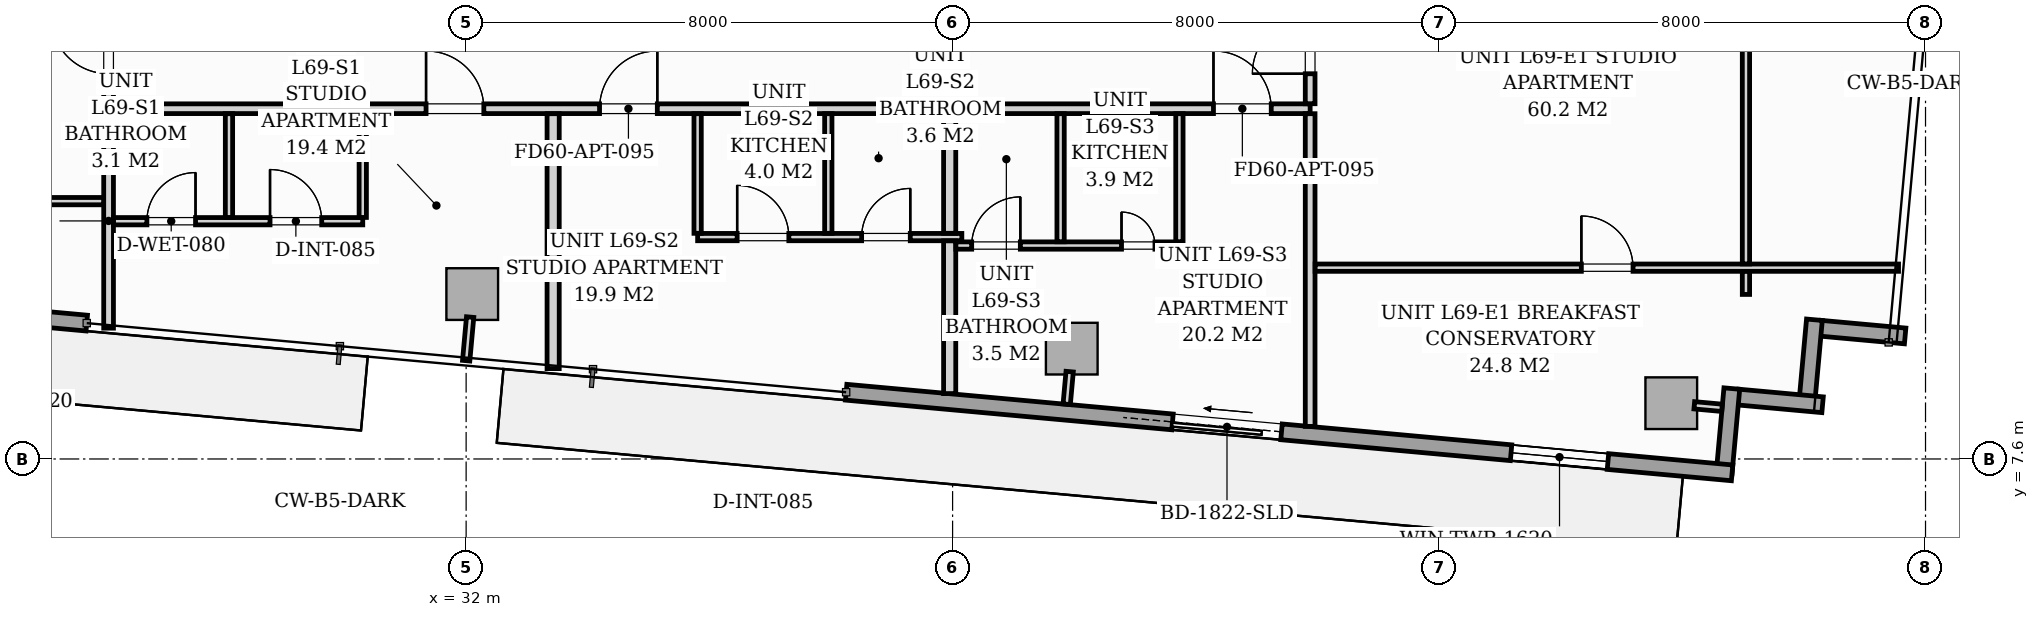
"""IFC4 building model, lengths in metres.
Left out: names, types, materials, properties, quantities, classifications, styles, units other than length and angle.
Written with IfcOpenShell. Run it as: python <this file> out.ifc"""

import sys

from ifc_helpers import new_model, si_unit, direction, frame, frame_2d, origin, origin_2d, place, context, subcontext, project, spatial, rectangle, extrude, source, transform, mapped, element, fill, save


model = new_model("IFC4")
c1 = context("Model", 3, precision=1e-05, world=origin(), true_north=direction((0.0, 1.0)))
c2 = subcontext(c1, "Body", "Model", "MODEL_VIEW")
j1 = project(units=[si_unit("LENGTHUNIT", "METRE"), si_unit("PLANEANGLEUNIT", "RADIAN")], contexts=[c1])
p1 = place(None, origin())
s1 = spatial("IfcSite", under=j1, at=p1, CompositionType="ELEMENT")
p2 = place(p1, origin())
s2 = spatial("IfcBuilding", under=s1, at=p2, CompositionType="ELEMENT")
p3 = place(p2, frame((0.0, 0.0, 239.7)))
s3 = spatial("IfcBuildingStorey", under=s2, at=p3, CompositionType="ELEMENT", Elevation=239.7)
m1 = source(origin(), c2, "Body", "SweptSolid", [
    extrude(rectangle(XDim=0.85, YDim=0.85, at=origin_2d()), origin(), (0.0, 0.0, 1.0), 3.296),
])
for number, where, z_axis, x_axis in (
    (1, (32.1, 10.312, 0.002), (0.0, 0.0, 1.0), (0.996, -0.091, 0.0)),
    (2, (41.96, 9.415, 0.002), (0.0, 0.0, 1.0), (0.996, -0.091, 0.0)),
    (3, (51.819, 8.517, 0.002), (0.0, 0.0, 1.0), (0.996, -0.091, 0.0)),
):
    element("IfcColumn", number, at=place(p3, frame(where, z_axis=z_axis, x_axis=x_axis)), inside=s3, PredefinedType="COLUMN", context=c2, shape_type="MappedRepresentation", body=[
        mapped(m1, transform((0.0, 0.0, 0.0), scale=1.0)),
    ])
for number, where, z_axis, x_axis in (
    (4, (55.665, 9.623, 0.0), (0.0, 0.0, 1.0), (-0.996, 0.091, 0.0)),
    (5, (54.173, 9.889, 0.0), (0.0, 0.0, 1.0), (-0.091, -0.996, 0.0)),
):
    element("IfcWall", number, at=place(p3, frame(where, z_axis=z_axis, x_axis=x_axis)), inside=s3, PredefinedType="STANDARD", context=c2, shape_type="SweptSolid", body=[
        extrude(rectangle(XDim=1.395, YDim=0.26, at=frame_2d((0.698, 0.0))), origin(), (0.0, 0.0, 1.0), 3.04),
    ])
for number, where, z_axis, x_axis in (
    (6, (54.307, 8.492, 0.0), (0.0, 0.0, 1.0), (-0.996, 0.091, 0.0)),
    (7, (52.815, 8.758, 0.0), (0.0, 0.0, 1.0), (-0.091, -0.996, 0.0)),
):
    element("IfcWall", number, at=place(p3, frame(where, z_axis=z_axis, x_axis=x_axis)), inside=s3, PredefinedType="STANDARD", context=c2, shape_type="SweptSolid", body=[
        extrude(rectangle(XDim=1.395, YDim=0.26, at=frame_2d((0.698, 0.0))), origin(), (0.0, 0.0, 1.0), 3.04),
    ])
p4 = place(p3, frame((52.819, 7.372, 0.0), z_axis=(0.0, 0.0, 1.0), x_axis=(-0.995884447498, 0.090632043071, 0.0)))
e8 = element("IfcWall", 8, at=p4, inside=s3, PredefinedType="STANDARD", context=c2, shape_type="SweptSolid", body=[
    extrude(rectangle(XDim=14.63, YDim=0.26, at=frame_2d((7.315, 0.0))), origin(), (0.0, 0.0, 1.0), 3.04),
])
p5 = place(p4, frame((7.441, 0.0, 0.0)))
e9 = element("IfcOpeningElement", 9, at=p5, cuts=e8, PredefinedType="OPENING", context=c2, shape_type="SweptSolid", body=[
    extrude(rectangle(XDim=1.8, YDim=2.06, at=frame_2d((0.9, 1.03))), frame((0.0, 0.14, 0.0), z_axis=(0.0, -1.0, 0.0), x_axis=(1.0, 0.0, 0.0)), (0.0, 0.0, 1.0), 0.28),
])
p6 = place(p4, frame((2.05, 0.0, 0.65)))
e10 = element("IfcOpeningElement", 10, at=p6, cuts=e8, PredefinedType="OPENING", context=c2, shape_type="SweptSolid", body=[
    extrude(rectangle(XDim=1.6, YDim=1.5, at=frame_2d((0.8, 0.75))), frame((0.0, 0.14, 0.0), z_axis=(0.0, -1.0, 0.0), x_axis=(1.0, 0.0, 0.0)), (0.0, 0.0, 1.0), 0.28),
])
p7 = place(p3, frame((25.761, 9.834, 0.0), z_axis=(0.0, 0.0, 1.0), x_axis=(-0.995884584572, 0.090630536861, 0.0)))
e11 = element("IfcWall", 11, at=p7, inside=s3, PredefinedType="STANDARD", context=c2, shape_type="SweptSolid", body=[
    extrude(rectangle(XDim=14.63, YDim=0.26, at=frame_2d((7.315, 0.0))), origin(), (0.0, 0.0, 1.0), 3.04),
])
p8 = place(p7, frame((4.97, 0.0, 0.0)))
e12 = element("IfcOpeningElement", 12, at=p8, cuts=e11, PredefinedType="OPENING", context=c2, shape_type="SweptSolid", body=[
    extrude(rectangle(XDim=1.8, YDim=2.06, at=frame_2d((0.9, 1.03))), frame((0.0, 0.14, 0.0), z_axis=(0.0, -1.0, 0.0), x_axis=(1.0, 0.0, 0.0)), (0.0, 0.0, 1.0), 0.28),
])
p9 = place(p7, frame((0.7, 0.0, 0.65)))
e13 = element("IfcOpeningElement", 13, at=p9, cuts=e11, PredefinedType="OPENING", context=c2, shape_type="SweptSolid", body=[
    extrude(rectangle(XDim=1.6, YDim=1.5, at=frame_2d((0.8, 0.75))), frame((0.0, 0.14, 0.0), z_axis=(0.0, -1.0, 0.0), x_axis=(1.0, 0.0, 0.0)), (0.0, 0.0, 1.0), 0.28),
])
p10 = place(p3, frame((26.12, 13.36, 0.0), z_axis=(0.0, 0.0, 1.0), x_axis=(1.0, 0.0, 0.0)))
e14 = element("IfcWall", 14, at=p10, inside=s3, PredefinedType="PARTITIONING", context=c2, shape_type="SweptSolid", body=[
    extrude(rectangle(XDim=19.76, YDim=0.16, at=frame_2d((9.88, 0.0))), origin(), (0.0, 0.0, 1.0), 2.605),
])
p11 = place(p10, frame((5.221, 0.0, 0.0)))
e15 = element("IfcOpeningElement", 15, at=p11, cuts=e14, PredefinedType="OPENING", context=c2, shape_type="SweptSolid", body=[
    extrude(rectangle(XDim=0.95, YDim=2.06, at=frame_2d((0.475, 1.03))), frame((0.0, 0.09, 0.0), z_axis=(0.0, -1.0, 0.0), x_axis=(1.0, 0.0, 0.0)), (0.0, 0.0, 1.0), 0.18),
])
p12 = place(p10, frame((8.074, 0.0, 0.0)))
e16 = element("IfcOpeningElement", 16, at=p12, cuts=e14, PredefinedType="OPENING", context=c2, shape_type="SweptSolid", body=[
    extrude(rectangle(XDim=0.95, YDim=2.06, at=frame_2d((0.475, 1.03))), frame((0.0, 0.09, 0.0), z_axis=(0.0, -1.0, 0.0), x_axis=(1.0, 0.0, 0.0)), (0.0, 0.0, 1.0), 0.18),
])
p13 = place(p10, frame((18.17, 0.0, 0.0)))
e17 = element("IfcOpeningElement", 17, at=p13, cuts=e14, PredefinedType="OPENING", context=c2, shape_type="SweptSolid", body=[
    extrude(rectangle(XDim=0.95, YDim=2.06, at=frame_2d((0.475, 1.03))), frame((0.0, 0.09, 0.0), z_axis=(0.0, -1.0, 0.0), x_axis=(1.0, 0.0, 0.0)), (0.0, 0.0, 1.0), 0.18),
])
p14 = place(p3, frame((26.12, 9.751, 0.0), z_axis=(0.0, 0.0, 1.0), x_axis=(0.0, 1.0, 0.0)))
e18 = element("IfcWall", 18, at=p14, inside=s3, PredefinedType="PARTITIONING", context=c2, shape_type="SweptSolid", body=[
    extrude(rectangle(XDim=3.527, YDim=0.16, at=frame_2d((1.763, 0.0))), origin(), (0.0, 0.0, 1.0), 3.04),
])
p15 = place(p3, frame((26.12, 13.442, 0.0), z_axis=(0.0, 0.0, 1.0), x_axis=(0.0, 1.0, 0.0)))
e19 = element("IfcWall", 19, at=p15, inside=s3, PredefinedType="PARTITIONING", context=c2, shape_type="SweptSolid", body=[
    extrude(rectangle(XDim=4.36, YDim=0.16, at=frame_2d((2.18, 0.0))), origin(), (0.0, 0.0, 1.0), 3.04),
])
p16 = place(p15, frame((0.493, 0.0, 0.0)))
e20 = element("IfcOpeningElement", 20, at=p16, cuts=e19, PredefinedType="OPENING", context=c2, shape_type="SweptSolid", body=[
    extrude(rectangle(XDim=0.95, YDim=2.06, at=frame_2d((0.475, 1.03))), frame((0.0, 0.09, 0.0), z_axis=(0.0, -1.0, 0.0), x_axis=(1.0, 0.0, 0.0)), (0.0, 0.0, 1.0), 0.18),
])
p17 = place(p3, frame((45.88, 8.136, 0.0), z_axis=(0.0, 0.0, 1.0), x_axis=(0.0, 1.0, 0.0)))
e21 = element("IfcWall", 21, at=p17, inside=s3, PredefinedType="PARTITIONING", context=c2, shape_type="SweptSolid", body=[
    extrude(rectangle(XDim=5.142, YDim=0.16, at=frame_2d((2.571, 0.0))), origin(), (0.0, 0.0, 1.0), 3.04),
])
p18 = place(p3, frame((45.88, 13.442, 0.0), z_axis=(0.0, 0.0, 1.0), x_axis=(0.0, 1.0, 0.0)))
e22 = element("IfcWall", 22, at=p18, inside=s3, PredefinedType="PARTITIONING", context=c2, shape_type="SweptSolid", body=[
    extrude(rectangle(XDim=4.36, YDim=0.16, at=frame_2d((2.18, 0.0))), origin(), (0.0, 0.0, 1.0), 3.04),
])
p19 = place(p18, frame((0.493, 0.0, 0.0)))
e23 = element("IfcOpeningElement", 23, at=p19, cuts=e22, PredefinedType="OPENING", context=c2, shape_type="SweptSolid", body=[
    extrude(rectangle(XDim=0.95, YDim=2.06, at=frame_2d((0.475, 1.03))), frame((0.0, 0.09, 0.0), z_axis=(0.0, -1.0, 0.0), x_axis=(1.0, 0.0, 0.0)), (0.0, 0.0, 1.0), 0.18),
])
p20 = place(p3, frame((26.202, 11.51, 0.0), z_axis=(0.0, 0.0, 1.0), x_axis=(1.0, 0.0, 0.0)))
e24 = element("IfcWall", 24, at=p20, inside=s3, PredefinedType="PARTITIONING", context=c2, shape_type="SweptSolid", body=[
    extrude(rectangle(XDim=4.098, YDim=0.12, at=frame_2d((2.049, 0.0))), origin(), (0.0, 0.0, 1.0), 2.605),
])
p21 = place(p20, frame((0.548, 0.0, 0.0)))
e25 = element("IfcOpeningElement", 25, at=p21, cuts=e24, PredefinedType="OPENING", context=c2, shape_type="SweptSolid", body=[
    extrude(rectangle(XDim=0.8, YDim=2.02, at=frame_2d((0.4, 1.01))), frame((0.0, 0.07, 0.0), z_axis=(0.0, -1.0, 0.0), x_axis=(1.0, 0.0, 0.0)), (0.0, 0.0, 1.0), 0.14),
])
p22 = place(p20, frame((2.573, 0.0, 0.0)))
e26 = element("IfcOpeningElement", 26, at=p22, cuts=e24, PredefinedType="OPENING", context=c2, shape_type="SweptSolid", body=[
    extrude(rectangle(XDim=0.85, YDim=2.05, at=frame_2d((0.425, 1.025))), frame((0.0, 0.07, 0.0), z_axis=(0.0, -1.0, 0.0), x_axis=(1.0, 0.0, 0.0)), (0.0, 0.0, 1.0), 0.14),
])
for number, where, z_axis, x_axis in (
    (27, (30.3, 11.572, 0.0), (0.0, 0.0, 1.0), (0.0, 1.0, 0.0)),
    (28, (28.1, 11.572, 0.0), (0.0, 0.0, 1.0), (0.0, 1.0, 0.0)),
):
    element("IfcWall", number, at=place(p3, frame(where, z_axis=z_axis, x_axis=x_axis)), inside=s3, PredefinedType="PARTITIONING", context=c2, shape_type="SweptSolid", body=[
        extrude(rectangle(XDim=1.706, YDim=0.12, at=frame_2d((0.853, 0.0))), origin(), (0.0, 0.0, 1.0), 3.04),
    ])
p23 = place(p3, frame((33.431, 9.086, 0.0), z_axis=(0.0, 0.0, 1.0), x_axis=(0.0, 1.0, 0.0)))
e29 = element("IfcWall", 29, at=p23, inside=s3, PredefinedType="PARTITIONING", context=c2, shape_type="SweptSolid", body=[
    extrude(rectangle(XDim=4.192, YDim=0.2, at=frame_2d((2.096, 0.0))), origin(), (0.0, 0.0, 1.0), 3.04),
])
p24 = place(p3, frame((35.807, 11.249, 0.0), z_axis=(0.0, 0.0, 1.0), x_axis=(1.0, 0.0, 0.0)))
e30 = element("IfcWall", 30, at=p24, inside=s3, PredefinedType="PARTITIONING", context=c2, shape_type="SweptSolid", body=[
    extrude(rectangle(XDim=4.345, YDim=0.12, at=frame_2d((2.173, 0.0))), origin(), (0.0, 0.0, 1.0), 3.04),
])
p25 = place(p24, frame((0.65, 0.0, 0.0)))
e31 = element("IfcOpeningElement", 31, at=p25, cuts=e30, PredefinedType="OPENING", context=c2, shape_type="SweptSolid", body=[
    extrude(rectangle(XDim=0.85, YDim=2.05, at=frame_2d((0.425, 1.025))), frame((0.0, 0.07, 0.0), z_axis=(0.0, -1.0, 0.0), x_axis=(1.0, 0.0, 0.0)), (0.0, 0.0, 1.0), 0.14),
])
p26 = place(p24, frame((2.697, 0.0, 0.0)))
e32 = element("IfcOpeningElement", 32, at=p26, cuts=e30, PredefinedType="OPENING", context=c2, shape_type="SweptSolid", body=[
    extrude(rectangle(XDim=0.8, YDim=2.02, at=frame_2d((0.4, 1.01))), frame((0.0, 0.07, 0.0), z_axis=(0.0, -1.0, 0.0), x_axis=(1.0, 0.0, 0.0)), (0.0, 0.0, 1.0), 0.14),
])
for number, where, z_axis, x_axis in (
    (33, (35.807, 11.311, 0.0), (0.0, 0.0, 1.0), (0.0, 1.0, 0.0)),
    (34, (37.956, 11.311, 0.0), (0.0, 0.0, 1.0), (0.0, 1.0, 0.0)),
):
    element("IfcWall", number, at=place(p3, frame(where, z_axis=z_axis, x_axis=x_axis)), inside=s3, PredefinedType="PARTITIONING", context=c2, shape_type="SweptSolid", body=[
        extrude(rectangle(XDim=1.967, YDim=0.12, at=frame_2d((0.983, 0.0))), origin(), (0.0, 0.0, 1.0), 3.04),
    ])
p27 = place(p3, frame((39.952, 8.675, 0.0), z_axis=(0.0, 0.0, 1.0), x_axis=(0.0, 1.0, 0.0)))
e35 = element("IfcWall", 35, at=p27, inside=s3, PredefinedType="PARTITIONING", context=c2, shape_type="SweptSolid", body=[
    extrude(rectangle(XDim=2.512, YDim=0.2, at=frame_2d((1.256, 0.0))), origin(), (0.0, 0.0, 1.0), 3.04),
])
p28 = place(p3, frame((39.952, 11.311, 0.0), z_axis=(0.0, 0.0, 1.0), x_axis=(0.0, 1.0, 0.0)))
e36 = element("IfcWall", 36, at=p28, inside=s3, PredefinedType="PARTITIONING", context=c2, shape_type="SweptSolid", body=[
    extrude(rectangle(XDim=1.967, YDim=0.2, at=frame_2d((0.983, 0.0))), origin(), (0.0, 0.0, 1.0), 3.04),
])
p29 = place(p3, frame((40.054, 11.11, 0.0), z_axis=(0.0, 0.0, 1.0), x_axis=(1.0, 0.0, 0.0)))
e37 = element("IfcWall", 37, at=p29, inside=s3, PredefinedType="PARTITIONING", context=c2, shape_type="SweptSolid", body=[
    extrude(rectangle(XDim=3.676, YDim=0.12, at=frame_2d((1.838, 0.0))), origin(), (0.0, 0.0, 1.0), 3.04),
])
p30 = place(p29, frame((0.26, 0.0, 0.0)))
e38 = element("IfcOpeningElement", 38, at=p30, cuts=e37, PredefinedType="OPENING", context=c2, shape_type="SweptSolid", body=[
    extrude(rectangle(XDim=0.8, YDim=2.02, at=frame_2d((0.4, 1.01))), frame((0.0, 0.07, 0.0), z_axis=(0.0, -1.0, 0.0), x_axis=(1.0, 0.0, 0.0)), (0.0, 0.0, 1.0), 0.14),
])
p31 = place(p29, frame((2.724, 0.0, 0.0)))
e39 = element("IfcOpeningElement", 39, at=p31, cuts=e37, PredefinedType="OPENING", context=c2, shape_type="SweptSolid", body=[
    extrude(rectangle(XDim=0.55, YDim=2.0, at=frame_2d((0.275, 1.0))), frame((0.0, 0.07, 0.0), z_axis=(0.0, -1.0, 0.0), x_axis=(1.0, 0.0, 0.0)), (0.0, 0.0, 1.0), 0.14),
])
for number, where, z_axis, x_axis in (
    (40, (43.73, 11.172, 0.0), (0.0, 0.0, 1.0), (0.0, 1.0, 0.0)),
    (41, (41.776, 11.172, 0.0), (0.0, 0.0, 1.0), (0.0, 1.0, 0.0)),
):
    element("IfcWall", number, at=place(p3, frame(where, z_axis=z_axis, x_axis=x_axis)), inside=s3, PredefinedType="PARTITIONING", context=c2, shape_type="SweptSolid", body=[
        extrude(rectangle(XDim=2.106, YDim=0.12, at=frame_2d((1.053, 0.0))), origin(), (0.0, 0.0, 1.0), 3.04),
    ])
p32 = place(p3, frame((11.516, 11.84, 0.0), z_axis=(0.0, 0.0, 1.0), x_axis=(1.0, 0.0, 0.0)))
e42 = element("IfcWall", 42, at=p32, inside=s3, PredefinedType="PARTITIONING", context=c2, shape_type="SweptSolid", body=[
    extrude(rectangle(XDim=14.522, YDim=0.12, at=frame_2d((7.261, 0.0))), origin(), (0.0, 0.0, 1.0), 2.483),
])
p33 = place(p32, frame((8.206, 0.0, 0.0)))
e43 = element("IfcOpeningElement", 43, at=p33, cuts=e42, PredefinedType="OPENING", context=c2, shape_type="SweptSolid", body=[
    extrude(rectangle(XDim=0.85, YDim=2.05, at=frame_2d((0.425, 1.025))), frame((0.0, 0.07, 0.0), z_axis=(0.0, -1.0, 0.0), x_axis=(1.0, 0.0, 0.0)), (0.0, 0.0, 1.0), 0.14),
])
p34 = place(p3, frame((45.962, 10.746, 0.0), z_axis=(0.0, 0.0, 1.0), x_axis=(1.0, 0.0, 0.0)))
e44 = element("IfcWall", 44, at=p34, inside=s3, PredefinedType="PARTITIONING", context=c2, shape_type="SweptSolid", body=[
    extrude(rectangle(XDim=9.594, YDim=0.12, at=frame_2d((4.797, 0.0))), origin(), (0.0, 0.0, 1.0), 3.04),
])
p35 = place(p34, frame((4.378, 0.0, 0.0)))
e45 = element("IfcOpeningElement", 45, at=p35, cuts=e44, PredefinedType="OPENING", context=c2, shape_type="SweptSolid", body=[
    extrude(rectangle(XDim=0.85, YDim=2.05, at=frame_2d((0.425, 1.025))), frame((0.0, 0.07, 0.0), z_axis=(0.0, -1.0, 0.0), x_axis=(1.0, 0.0, 0.0)), (0.0, 0.0, 1.0), 0.14),
])
p36 = place(p3, frame((53.047, 10.306, 0.0), z_axis=(0.0, 0.0, 1.0), x_axis=(0.0, 1.0, 0.0)))
e46 = element("IfcWall", 46, at=p36, inside=s3, PredefinedType="PARTITIONING", context=c2, shape_type="SweptSolid", body=[
    extrude(rectangle(XDim=0.378, YDim=0.12, at=frame_2d((0.189, 0.0))), origin(), (0.0, 0.0, 1.0), 3.04),
])
p37 = place(p3, frame((53.047, 10.808, 0.0), z_axis=(0.0, 0.0, 1.0), x_axis=(0.0, 1.0, 0.0)))
e47 = element("IfcWall", 47, at=p37, inside=s3, PredefinedType="PARTITIONING", context=c2, shape_type="SweptSolid", body=[
    extrude(rectangle(XDim=10.084, YDim=0.12, at=frame_2d((5.042, 0.0))), origin(), (0.0, 0.0, 1.0), 3.04),
])
p38 = place(p37, frame((3.54, 0.0, 0.0)))
e48 = element("IfcOpeningElement", 48, at=p38, cuts=e47, PredefinedType="OPENING", context=c2, shape_type="SweptSolid", body=[
    extrude(rectangle(XDim=0.85, YDim=2.05, at=frame_2d((0.425, 1.025))), frame((0.0, 0.07, 0.0), z_axis=(0.0, -1.0, 0.0), x_axis=(1.0, 0.0, 0.0)), (0.0, 0.0, 1.0), 0.14),
])
p39 = place(p3, frame((32.066, 9.933, 0.0), z_axis=(0.0, 0.0, 1.0), x_axis=(-0.090872036342, -0.995862577373, 0.0)))
e49 = element("IfcWall", 49, at=p39, inside=s3, PredefinedType="PARTITIONING", context=c2, shape_type="SweptSolid", body=[
    extrude(rectangle(XDim=0.72, YDim=0.12, at=frame_2d((0.36, 0.0))), origin(), (0.0, 0.0, 1.0), 3.04),
])
p40 = place(p3, frame((41.925, 9.036, 0.0), z_axis=(0.0, 0.0, 1.0), x_axis=(-0.090740281653, -0.995874591144, 0.0)))
e50 = element("IfcWall", 50, at=p40, inside=s3, PredefinedType="PARTITIONING", context=c2, shape_type="SweptSolid", body=[
    extrude(rectangle(XDim=0.538, YDim=0.12, at=frame_2d((0.269, 0.0))), origin(), (0.0, 0.0, 1.0), 3.04),
])
p41 = place(p3, frame((52.197, 8.483, 0.0), z_axis=(0.0, 0.0, 1.0), x_axis=(0.995884462012, -0.090631883588, 0.0)))
e51 = element("IfcWall", 51, at=p41, inside=s3, PredefinedType="PARTITIONING", context=c2, shape_type="SweptSolid", body=[
    extrude(rectangle(XDim=0.458, YDim=0.12, at=frame_2d((0.229, 0.0))), origin(), (0.0, 0.0, 1.0), 3.04),
])
m2 = source(origin(), c2, "Body", "SweptSolid", [
    extrude(rectangle(XDim=1.8, YDim=2.06, at=frame_2d((0.9, 1.03))), frame((0.0, 0.025, 0.0), z_axis=(0.0, -1.0, 0.0), x_axis=(1.0, 0.0, 0.0)), (0.0, 0.0, 1.0), 0.05),
])
p42 = place(p5, origin())
e52 = element("IfcDoor", 52, at=p42, inside=s3, OperationType="SLIDING_TO_RIGHT", PredefinedType="DOOR", context=c2, shape_type="MappedRepresentation", body=[
    mapped(m2, transform((0.0, 0.0, 0.0), scale=1.0)),
])
fill(e9, e52)
m3 = source(origin(), c2, "Body", "SweptSolid", [
    extrude(rectangle(XDim=1.6, YDim=1.5, at=frame_2d((0.8, 0.75))), frame((0.0, 0.03, 0.0), z_axis=(0.0, -1.0, 0.0), x_axis=(1.0, 0.0, 0.0)), (0.0, 0.0, 1.0), 0.06),
])
p43 = place(p6, origin())
e53 = element("IfcWindow", 53, at=p43, inside=s3, PartitioningType="SINGLE_PANEL", PredefinedType="WINDOW", context=c2, shape_type="MappedRepresentation", body=[
    mapped(m3, transform((0.0, 0.0, 0.0), scale=1.0)),
])
fill(e10, e53)
m4 = source(origin(), c2, "Body", "SweptSolid", [
    extrude(rectangle(XDim=0.95, YDim=2.06, at=frame_2d((0.475, 1.03))), frame((0.0, 0.025, 0.0), z_axis=(0.0, -1.0, 0.0), x_axis=(1.0, 0.0, 0.0)), (0.0, 0.0, 1.0), 0.05),
])
p44 = place(p11, origin())
e54 = element("IfcDoor", 54, at=p44, inside=s3, OperationType="SINGLE_SWING_LEFT", PredefinedType="DOOR", context=c2, shape_type="MappedRepresentation", body=[
    mapped(m4, transform((0.0, 0.0, 0.0), scale=1.0)),
])
fill(e15, e54)
m5 = source(origin(), c2, "Body", "SweptSolid", [
    extrude(rectangle(XDim=0.8, YDim=2.02, at=frame_2d((0.4, 1.01))), frame((0.0, 0.025, 0.0), z_axis=(0.0, -1.0, 0.0), x_axis=(1.0, 0.0, 0.0)), (0.0, 0.0, 1.0), 0.05),
])
p45 = place(p21, origin())
e55 = element("IfcDoor", 55, at=p45, inside=s3, OperationType="SINGLE_SWING_RIGHT", PredefinedType="DOOR", context=c2, shape_type="MappedRepresentation", body=[
    mapped(m5, transform((0.0, 0.0, 0.0), scale=1.0)),
])
fill(e25, e55)
m6 = source(origin(), c2, "Body", "SweptSolid", [
    extrude(rectangle(XDim=0.85, YDim=2.05, at=frame_2d((0.425, 1.025))), frame((0.0, 0.025, 0.0), z_axis=(0.0, -1.0, 0.0), x_axis=(1.0, 0.0, 0.0)), (0.0, 0.0, 1.0), 0.05),
])
p46 = place(p22, origin())
e56 = element("IfcDoor", 56, at=p46, inside=s3, OperationType="SINGLE_SWING_LEFT", PredefinedType="DOOR", context=c2, shape_type="MappedRepresentation", body=[
    mapped(m6, transform((0.0, 0.0, 0.0), scale=1.0)),
])
fill(e26, e56)
p47 = place(p12, origin())
e57 = element("IfcDoor", 57, at=p47, inside=s3, OperationType="SINGLE_SWING_RIGHT", PredefinedType="DOOR", context=c2, shape_type="MappedRepresentation", body=[
    mapped(m4, transform((0.0, 0.0, 0.0), scale=1.0)),
])
fill(e16, e57)
p48 = place(p25, origin())
e58 = element("IfcDoor", 58, at=p48, inside=s3, OperationType="SINGLE_SWING_LEFT", PredefinedType="DOOR", context=c2, shape_type="MappedRepresentation", body=[
    mapped(m6, transform((0.0, 0.0, 0.0), scale=1.0)),
])
fill(e31, e58)
p49 = place(p26, origin())
e59 = element("IfcDoor", 59, at=p49, inside=s3, OperationType="SINGLE_SWING_RIGHT", PredefinedType="DOOR", context=c2, shape_type="MappedRepresentation", body=[
    mapped(m5, transform((0.0, 0.0, 0.0), scale=1.0)),
])
fill(e32, e59)
p50 = place(p13, origin())
e60 = element("IfcDoor", 60, at=p50, inside=s3, OperationType="SINGLE_SWING_LEFT", PredefinedType="DOOR", context=c2, shape_type="MappedRepresentation", body=[
    mapped(m4, transform((0.0, 0.0, 0.0), scale=1.0)),
])
fill(e17, e60)
p51 = place(p30, origin())
e61 = element("IfcDoor", 61, at=p51, inside=s3, OperationType="SINGLE_SWING_RIGHT", PredefinedType="DOOR", context=c2, shape_type="MappedRepresentation", body=[
    mapped(m5, transform((0.0, 0.0, 0.0), scale=1.0)),
])
fill(e38, e61)
m7 = source(origin(), c2, "Body", "SweptSolid", [
    extrude(rectangle(XDim=0.55, YDim=2.0, at=frame_2d((0.275, 1.0))), frame((0.0, 0.025, 0.0), z_axis=(0.0, -1.0, 0.0), x_axis=(1.0, 0.0, 0.0)), (0.0, 0.0, 1.0), 0.05),
])
p52 = place(p31, origin())
e62 = element("IfcDoor", 62, at=p52, inside=s3, OperationType="SINGLE_SWING_LEFT", PredefinedType="DOOR", context=c2, shape_type="MappedRepresentation", body=[
    mapped(m7, transform((0.0, 0.0, 0.0), scale=1.0)),
])
fill(e39, e62)
p53 = place(p16, origin())
e63 = element("IfcDoor", 63, at=p53, inside=s3, OperationType="SINGLE_SWING_RIGHT", PredefinedType="DOOR", context=c2, shape_type="MappedRepresentation", body=[
    mapped(m4, transform((0.0, 0.0, 0.0), scale=1.0)),
])
fill(e20, e63)
p54 = place(p19, origin())
e64 = element("IfcDoor", 64, at=p54, inside=s3, OperationType="SINGLE_SWING_LEFT", PredefinedType="DOOR", context=c2, shape_type="MappedRepresentation", body=[
    mapped(m4, transform((0.0, 0.0, 0.0), scale=1.0)),
])
fill(e23, e64)
p55 = place(p35, origin())
e65 = element("IfcDoor", 65, at=p55, inside=s3, OperationType="SINGLE_SWING_LEFT", PredefinedType="DOOR", context=c2, shape_type="MappedRepresentation", body=[
    mapped(m6, transform((0.0, 0.0, 0.0), scale=1.0)),
])
fill(e45, e65)
save(model, sys.argv[1])
